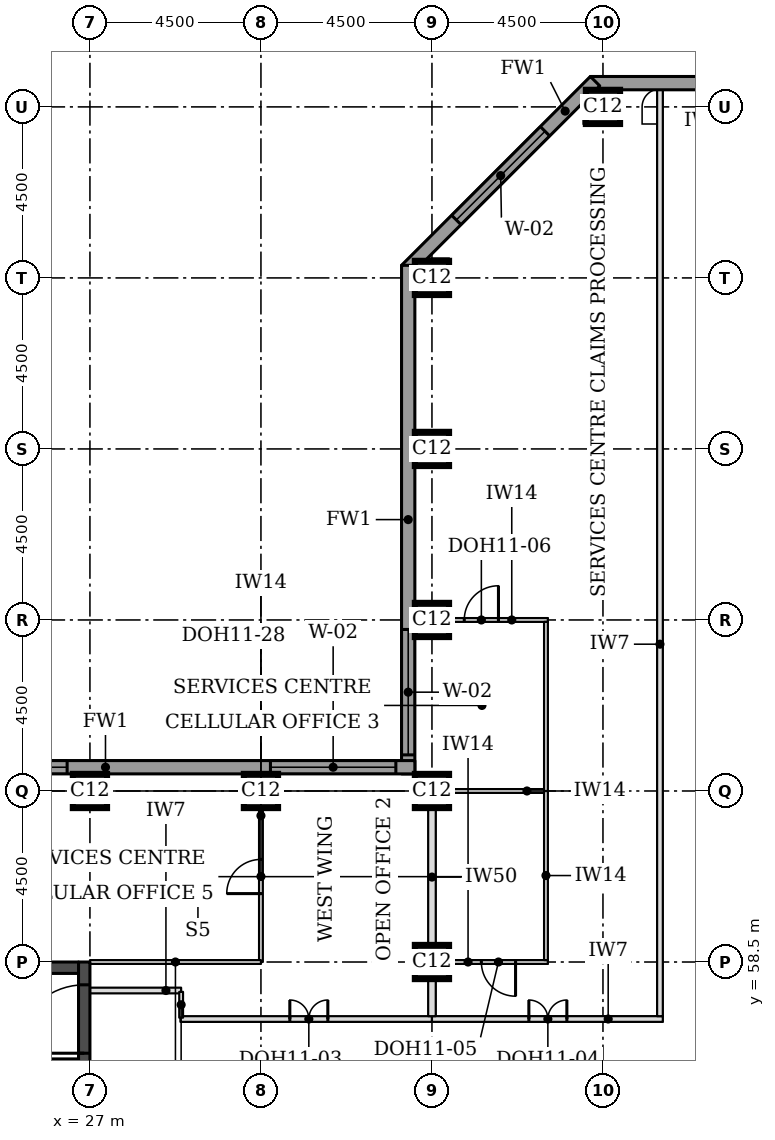
"""IFC4 building model, lengths in metres.
Left out: names, types, materials, properties, quantities, classifications, styles, units other than length and angle.
Written with IfcOpenShell. Run it as: python <this file> out.ifc"""

import sys

from ifc_helpers import new_model, si_unit, direction, frame, frame_2d, origin, origin_2d, place, context, subcontext, project, spatial, rectangle, extrude, element, fill, save


model = new_model("IFC4")
c1 = context("Model", 3, precision=1e-05, world=origin(), true_north=direction((0.0, 1.0)))
c2 = subcontext(c1, "Body", "Model", "MODEL_VIEW")
j1 = project(units=[si_unit("LENGTHUNIT", "METRE"), si_unit("PLANEANGLEUNIT", "RADIAN")], contexts=[c1])
p1 = place(None, origin())
s1 = spatial("IfcSite", under=j1, at=p1, CompositionType="ELEMENT")
p2 = place(p1, origin())
s2 = spatial("IfcBuilding", under=s1, at=p2, CompositionType="ELEMENT")
p3 = place(p2, frame((0.0, 0.0, 234.1)))
s3 = spatial("IfcBuildingStorey", under=s2, at=p3, CompositionType="ELEMENT", Elevation=234.1)
for number, where, z_axis, x_axis in (
    (1, (36.0, 58.5, 0.0), (0.0, 0.0, 1.0), (1.0, 0.0, 0.0)),
    (2, (27.0, 63.0, 0.0), (0.0, 0.0, 1.0), (1.0, 0.0, 0.0)),
    (3, (31.5, 63.0, 0.0), (0.0, 0.0, 1.0), (1.0, 0.0, 0.0)),
    (4, (36.0, 63.0, 0.0), (0.0, 0.0, 1.0), (1.0, 0.0, 0.0)),
    (5, (36.0, 67.5, 0.0), (0.0, 0.0, 1.0), (1.0, 0.0, 0.0)),
    (6, (36.0, 72.0, 0.0), (0.0, 0.0, 1.0), (1.0, 0.0, 0.0)),
    (7, (36.0, 76.5, 0.0), (0.0, 0.0, 1.0), (1.0, 0.0, 0.0)),
    (8, (40.5, 81.0, 0.0), (0.0, 0.0, 1.0), (1.0, 0.0, 0.0)),
):
    element("IfcColumn", number, at=place(p3, frame(where, z_axis=z_axis, x_axis=x_axis)), inside=s3, PredefinedType="COLUMN", context=c2, shape_type="SweptSolid", body=[
        extrude(rectangle(XDim=0.9, YDim=0.9, at=origin_2d()), origin(), (0.0, 0.0, 1.0), 3.7),
    ])
p4 = place(p3, frame((18.3, 58.35, 0.0), z_axis=(0.0, 0.0, 1.0), x_axis=(1.0, 0.0, 0.0)))
e9 = element("IfcWall", 9, at=p4, inside=s3, PredefinedType="SHEAR", context=c2, shape_type="SweptSolid", body=[
    extrude(rectangle(XDim=8.4, YDim=0.3, at=frame_2d((4.2, 0.0))), origin(), (0.0, 0.0, 1.0), 3.7),
])
p5 = place(p3, frame((26.85, 49.5, 0.0), z_axis=(0.0, 0.0, 1.0), x_axis=(0.0, 1.0, 0.0)))
e10 = element("IfcWall", 10, at=p5, inside=s3, PredefinedType="SHEAR", context=c2, shape_type="SweptSolid", body=[
    extrude(rectangle(XDim=9.0, YDim=0.3, at=frame_2d((4.5, 0.0))), origin(), (0.0, 0.0, 1.0), 3.7),
])
p6 = place(p5, frame((6.6, 0.0, 0.0)))
e11 = element("IfcOpeningElement", 11, at=p6, cuts=e10, PredefinedType="OPENING", context=c2, shape_type="SweptSolid", body=[
    extrude(rectangle(XDim=1.8, YDim=2.1, at=frame_2d((0.9, 1.05))), frame((0.0, 0.16, 0.0), z_axis=(0.0, -1.0, 0.0), x_axis=(1.0, 0.0, 0.0)), (0.0, 0.0, 1.0), 0.32),
])
p7 = place(p3, frame((72.331, 81.625, 0.0), z_axis=(0.0, 0.0, 1.0), x_axis=(-1.0, 0.0, 0.0)))
e12 = element("IfcWall", 12, at=p7, inside=s3, PredefinedType="STANDARD", context=c2, shape_type="SweptSolid", body=[
    extrude(rectangle(XDim=32.163, YDim=0.35, at=frame_2d((16.081, 0.0))), origin(), (0.0, 0.0, 1.0), 3.525),
])
p8 = place(p7, frame((5.431, 0.0, 0.9)))
e13 = element("IfcOpeningElement", 13, at=p8, cuts=e12, PredefinedType="OPENING", context=c2, shape_type="SweptSolid", body=[
    extrude(rectangle(XDim=3.3, YDim=1.9, at=frame_2d((1.65, 0.95))), frame((0.0, 0.185, 0.0), z_axis=(0.0, -1.0, 0.0), x_axis=(1.0, 0.0, 0.0)), (0.0, 0.0, 1.0), 0.37),
])
p9 = place(p7, frame((9.931, 0.0, 0.9)))
e14 = element("IfcOpeningElement", 14, at=p9, cuts=e12, PredefinedType="OPENING", context=c2, shape_type="SweptSolid", body=[
    extrude(rectangle(XDim=3.3, YDim=1.9, at=frame_2d((1.65, 0.95))), frame((0.0, 0.185, 0.0), z_axis=(0.0, -1.0, 0.0), x_axis=(1.0, 0.0, 0.0)), (0.0, 0.0, 1.0), 0.37),
])
p10 = place(p7, frame((14.431, 0.0, 0.9)))
e15 = element("IfcOpeningElement", 15, at=p10, cuts=e12, PredefinedType="OPENING", context=c2, shape_type="SweptSolid", body=[
    extrude(rectangle(XDim=3.3, YDim=1.9, at=frame_2d((1.65, 0.95))), frame((0.0, 0.185, 0.0), z_axis=(0.0, -1.0, 0.0), x_axis=(1.0, 0.0, 0.0)), (0.0, 0.0, 1.0), 0.37),
])
p11 = place(p7, frame((18.931, 0.0, 0.9)))
e16 = element("IfcOpeningElement", 16, at=p11, cuts=e12, PredefinedType="OPENING", context=c2, shape_type="SweptSolid", body=[
    extrude(rectangle(XDim=3.3, YDim=1.9, at=frame_2d((1.65, 0.95))), frame((0.0, 0.185, 0.0), z_axis=(0.0, -1.0, 0.0), x_axis=(1.0, 0.0, 0.0)), (0.0, 0.0, 1.0), 0.37),
])
p12 = place(p7, frame((23.431, 0.0, 0.9)))
e17 = element("IfcOpeningElement", 17, at=p12, cuts=e12, PredefinedType="OPENING", context=c2, shape_type="SweptSolid", body=[
    extrude(rectangle(XDim=3.3, YDim=1.9, at=frame_2d((1.65, 0.95))), frame((0.0, 0.185, 0.0), z_axis=(0.0, -1.0, 0.0), x_axis=(1.0, 0.0, 0.0)), (0.0, 0.0, 1.0), 0.37),
])
p13 = place(p3, frame((40.292, 81.676, 0.0), z_axis=(0.0, 0.0, 1.0), x_axis=(-0.707106781187, -0.707106781187, 0.0)))
e18 = element("IfcWall", 18, at=p13, inside=s3, PredefinedType="STANDARD", context=c2, shape_type="SweptSolid", body=[
    extrude(rectangle(XDim=7.027, YDim=0.35, at=frame_2d((3.513, 0.0))), origin(), (0.0, 0.0, 1.0), 3.525),
])
p14 = place(p13, frame((1.863, 0.0, 0.9)))
e19 = element("IfcOpeningElement", 19, at=p14, cuts=e18, PredefinedType="OPENING", context=c2, shape_type="SweptSolid", body=[
    extrude(rectangle(XDim=3.3, YDim=1.9, at=frame_2d((1.65, 0.95))), frame((0.0, 0.185, 0.0), z_axis=(0.0, -1.0, 0.0), x_axis=(1.0, 0.0, 0.0)), (0.0, 0.0, 1.0), 0.37),
])
p15 = place(p3, frame((35.375, 76.831, 0.0), z_axis=(0.0, 0.0, 1.0), x_axis=(0.0, -1.0, 0.0)))
e20 = element("IfcWall", 20, at=p15, inside=s3, PredefinedType="STANDARD", context=c2, shape_type="SweptSolid", body=[
    extrude(rectangle(XDim=13.381, YDim=0.35, at=frame_2d((6.691, 0.0))), origin(), (0.0, 0.0, 1.0), 3.525),
])
p16 = place(p15, frame((9.581, 0.0, 0.9)))
e21 = element("IfcOpeningElement", 21, at=p16, cuts=e20, PredefinedType="OPENING", context=c2, shape_type="SweptSolid", body=[
    extrude(rectangle(XDim=3.3, YDim=1.9, at=frame_2d((1.65, 0.95))), frame((0.0, 0.185, 0.0), z_axis=(0.0, -1.0, 0.0), x_axis=(1.0, 0.0, 0.0)), (0.0, 0.0, 1.0), 0.37),
])
p17 = place(p3, frame((35.55, 63.625, 0.0), z_axis=(0.0, 0.0, 1.0), x_axis=(-1.0, 0.0, 0.0)))
e22 = element("IfcWall", 22, at=p17, inside=s3, PredefinedType="STANDARD", context=c2, shape_type="SweptSolid", body=[
    extrude(rectangle(XDim=17.881, YDim=0.35, at=frame_2d((8.941, 0.0))), origin(), (0.0, 0.0, 1.0), 3.525),
])
p18 = place(p17, frame((0.5, 0.0, 0.9)))
e23 = element("IfcOpeningElement", 23, at=p18, cuts=e22, PredefinedType="OPENING", context=c2, shape_type="SweptSolid", body=[
    extrude(rectangle(XDim=3.3, YDim=1.9, at=frame_2d((1.65, 0.95))), frame((0.0, 0.185, 0.0), z_axis=(0.0, -1.0, 0.0), x_axis=(1.0, 0.0, 0.0)), (0.0, 0.0, 1.0), 0.37),
])
p19 = place(p17, frame((9.15, 0.0, 0.9)))
e24 = element("IfcOpeningElement", 24, at=p19, cuts=e22, PredefinedType="OPENING", context=c2, shape_type="SweptSolid", body=[
    extrude(rectangle(XDim=3.3, YDim=1.9, at=frame_2d((1.65, 0.95))), frame((0.0, 0.185, 0.0), z_axis=(0.0, -1.0, 0.0), x_axis=(1.0, 0.0, 0.0)), (0.0, 0.0, 1.0), 0.37),
])
p20 = place(p3, frame((29.38, 57.0, 0.0), z_axis=(0.0, 0.0, 1.0), x_axis=(1.0, 0.0, 0.0)))
e25 = element("IfcWall", 25, at=p20, inside=s3, PredefinedType="PARTITIONING", context=c2, shape_type="SweptSolid", body=[
    extrude(rectangle(XDim=6.62, YDim=0.15, at=frame_2d((3.31, 0.0))), origin(), (0.0, 0.0, 1.0), 3.55),
])
p21 = place(p20, frame((2.88, 0.0, 0.0)))
e26 = element("IfcOpeningElement", 26, at=p21, cuts=e25, PredefinedType="OPENING", context=c2, shape_type="SweptSolid", body=[
    extrude(rectangle(XDim=1.0, YDim=2.1, at=frame_2d((0.5, 1.05))), frame((0.0, 0.085, 0.0), z_axis=(0.0, -1.0, 0.0), x_axis=(1.0, 0.0, 0.0)), (0.0, 0.0, 1.0), 0.17),
])
p22 = place(p3, frame((36.0, 57.0, 0.0), z_axis=(0.0, 0.0, 1.0), x_axis=(1.0, 0.0, 0.0)))
e27 = element("IfcWall", 27, at=p22, inside=s3, PredefinedType="PARTITIONING", context=c2, shape_type="SweptSolid", body=[
    extrude(rectangle(XDim=6.075, YDim=0.15, at=frame_2d((3.038, 0.0))), origin(), (0.0, 0.0, 1.0), 3.55),
])
p23 = place(p22, frame((2.55, 0.0, 0.0)))
e28 = element("IfcOpeningElement", 28, at=p23, cuts=e27, PredefinedType="OPENING", context=c2, shape_type="SweptSolid", body=[
    extrude(rectangle(XDim=1.0, YDim=2.1, at=frame_2d((0.5, 1.05))), frame((0.0, 0.085, 0.0), z_axis=(0.0, -1.0, 0.0), x_axis=(1.0, 0.0, 0.0)), (0.0, 0.0, 1.0), 0.17),
])
p24 = place(p3, frame((36.45, 58.5, 0.0), z_axis=(0.0, 0.0, 1.0), x_axis=(1.0, 0.0, 0.0)))
e29 = element("IfcWall", 29, at=p24, inside=s3, PredefinedType="PARTITIONING", context=c2, shape_type="SweptSolid", body=[
    extrude(rectangle(XDim=2.6, YDim=0.1, at=frame_2d((1.3, 0.0))), origin(), (0.0, 0.0, 1.0), 3.55),
])
p25 = place(p24, frame((0.85, 0.0, 0.0)))
e30 = element("IfcOpeningElement", 30, at=p25, cuts=e29, PredefinedType="OPENING", context=c2, shape_type="SweptSolid", body=[
    extrude(rectangle(XDim=0.9, YDim=2.1, at=frame_2d((0.45, 1.05))), frame((0.0, 0.06, 0.0), z_axis=(0.0, -1.0, 0.0), x_axis=(1.0, 0.0, 0.0)), (0.0, 0.0, 1.0), 0.12),
])
p26 = place(p3, frame((36.45, 63.0, 0.0), z_axis=(0.0, 0.0, 1.0), x_axis=(1.0, 0.0, 0.0)))
e31 = element("IfcWall", 31, at=p26, inside=s3, PredefinedType="PARTITIONING", context=c2, shape_type="SweptSolid", body=[
    extrude(rectangle(XDim=2.5, YDim=0.1, at=frame_2d((1.25, 0.0))), origin(), (0.0, 0.0, 1.0), 3.55),
])
p27 = place(p3, frame((35.55, 67.5, 0.0), z_axis=(0.0, 0.0, 1.0), x_axis=(1.0, 0.0, 0.0)))
e32 = element("IfcWall", 32, at=p27, inside=s3, PredefinedType="PARTITIONING", context=c2, shape_type="SweptSolid", body=[
    extrude(rectangle(XDim=3.5, YDim=0.1, at=frame_2d((1.75, 0.0))), origin(), (0.0, 0.0, 1.0), 3.55),
])
p28 = place(p27, frame((1.3, 0.0, 0.0)))
e33 = element("IfcOpeningElement", 33, at=p28, cuts=e32, PredefinedType="OPENING", context=c2, shape_type="SweptSolid", body=[
    extrude(rectangle(XDim=0.9, YDim=2.1, at=frame_2d((0.45, 1.05))), frame((0.0, 0.06, 0.0), z_axis=(0.0, -1.0, 0.0), x_axis=(1.0, 0.0, 0.0)), (0.0, 0.0, 1.0), 0.12),
])
p29 = place(p3, frame((36.0, 57.075, 0.0), z_axis=(0.0, 0.0, 1.0), x_axis=(0.0, 1.0, 0.0)))
e34 = element("IfcWall", 34, at=p29, inside=s3, PredefinedType="PARTITIONING", context=c2, shape_type="SweptSolid", body=[
    extrude(rectangle(XDim=0.975, YDim=0.2, at=frame_2d((0.488, 0.0))), origin(), (0.0, 0.0, 1.0), 2.8),
])
p30 = place(p3, frame((42.0, 57.075, 0.0), z_axis=(0.0, 0.0, 1.0), x_axis=(0.0, 1.0, 0.0)))
e35 = element("IfcWall", 35, at=p30, inside=s3, PredefinedType="PARTITIONING", context=c2, shape_type="SweptSolid", body=[
    extrude(rectangle(XDim=24.375, YDim=0.15, at=frame_2d((12.188, 0.0))), origin(), (0.0, 0.0, 1.0), 3.55),
])
p31 = place(p3, frame((39.0, 58.55, 0.0), z_axis=(0.0, 0.0, 1.0), x_axis=(0.0, 1.0, 0.0)))
e36 = element("IfcWall", 36, at=p31, inside=s3, PredefinedType="PARTITIONING", context=c2, shape_type="SweptSolid", body=[
    extrude(rectangle(XDim=4.45, YDim=0.1, at=frame_2d((2.225, 0.0))), origin(), (0.0, 0.0, 1.0), 3.55),
])
p32 = place(p3, frame((36.0, 58.92, 0.0), z_axis=(0.0, 0.0, 1.0), x_axis=(0.0, 1.0, 0.0)))
e37 = element("IfcWall", 37, at=p32, inside=s3, PredefinedType="PARTITIONING", context=c2, shape_type="SweptSolid", body=[
    extrude(rectangle(XDim=3.63, YDim=0.2, at=frame_2d((1.815, 0.0))), origin(), (0.0, 0.0, 1.0), 2.8),
])
p33 = place(p3, frame((39.0, 63.0, 0.0), z_axis=(0.0, 0.0, 1.0), x_axis=(0.0, 1.0, 0.0)))
e38 = element("IfcWall", 38, at=p33, inside=s3, PredefinedType="PARTITIONING", context=c2, shape_type="SweptSolid", body=[
    extrude(rectangle(XDim=4.45, YDim=0.1, at=frame_2d((2.225, 0.0))), origin(), (0.0, 0.0, 1.0), 3.55),
])
p34 = place(p3, frame((31.5, 63.0, 0.0), z_axis=(0.0, 0.0, 1.0), x_axis=(0.0, -1.0, 0.0)))
e39 = element("IfcWall", 39, at=p34, inside=s3, PredefinedType="PARTITIONING", context=c2, shape_type="SweptSolid", body=[
    extrude(rectangle(XDim=4.5, YDim=0.1, at=frame_2d((2.25, 0.0))), origin(), (0.0, 0.0, 1.0), 3.55),
])
p35 = place(p34, frame((1.8, 0.0, 0.0)))
e40 = element("IfcOpeningElement", 40, at=p35, cuts=e39, PredefinedType="OPENING", context=c2, shape_type="SweptSolid", body=[
    extrude(rectangle(XDim=0.9, YDim=2.1, at=frame_2d((0.45, 1.05))), frame((0.0, 0.06, 0.0), z_axis=(0.0, -1.0, 0.0), x_axis=(1.0, 0.0, 0.0)), (0.0, 0.0, 1.0), 0.12),
])
p36 = place(p3, frame((31.5, 58.5, 0.0), z_axis=(0.0, 0.0, 1.0), x_axis=(-1.0, 0.0, 0.0)))
e41 = element("IfcWall", 41, at=p36, inside=s3, PredefinedType="PARTITIONING", context=c2, shape_type="SweptSolid", body=[
    extrude(rectangle(XDim=4.5, YDim=0.1, at=frame_2d((2.25, 0.0))), origin(), (0.0, 0.0, 1.0), 2.55),
])
p37 = place(p3, frame((27.0, 57.75, 0.0), z_axis=(0.0, 0.0, 1.0), x_axis=(1.0, 0.0, 0.0)))
e42 = element("IfcWall", 42, at=p37, inside=s3, PredefinedType="PARTITIONING", context=c2, shape_type="SweptSolid", body=[
    extrude(rectangle(XDim=2.4, YDim=0.15, at=frame_2d((1.2, 0.0))), origin(), (0.0, 0.0, 1.0), 3.55),
])
p38 = place(p3, frame((29.4, 57.715, 0.0), z_axis=(0.0, 0.0, 1.0), x_axis=(0.0, -1.0, 0.0)))
e43 = element("IfcWall", 43, at=p38, inside=s3, PredefinedType="PARTITIONING", context=c2, shape_type="SweptSolid", body=[
    extrude(rectangle(XDim=0.68, YDim=0.1, at=frame_2d((0.34, 0.0))), origin(), (0.0, 0.0, 1.0), 3.55),
])
p39 = place(p3, frame((23.2, 55.85, 0.0), z_axis=(0.0, 0.0, 1.0), x_axis=(1.0, 0.0, 0.0)))
e44 = element("IfcWall", 44, at=p39, inside=s3, PredefinedType="SOLIDWALL", context=c2, shape_type="SweptSolid", body=[
    extrude(rectangle(XDim=3.5, YDim=0.2, at=frame_2d((1.75, 0.0))), origin(), (0.0, 0.0, 1.0), 3.55),
])
p40 = place(p39, frame((1.2, 0.0, 0.0)))
e45 = element("IfcOpeningElement", 45, at=p40, cuts=e44, PredefinedType="OPENING", context=c2, shape_type="SweptSolid", body=[
    extrude(rectangle(XDim=1.1, YDim=2.1, at=frame_2d((0.55, 1.05))), frame((0.0, 0.11, 0.0), z_axis=(0.0, -1.0, 0.0), x_axis=(1.0, 0.0, 0.0)), (0.0, 0.0, 1.0), 0.22),
])
p41 = place(p14, origin())
e46 = element("IfcWindow", 46, at=p41, inside=s3, PartitioningType="SINGLE_PANEL", PredefinedType="WINDOW", context=c2, shape_type="SweptSolid", body=[
    extrude(rectangle(XDim=3.3, YDim=1.9, at=frame_2d((1.65, 0.95))), frame((0.0, 0.085, 0.0), z_axis=(0.0, -1.0, 0.0), x_axis=(1.0, 0.0, 0.0)), (0.0, 0.0, 1.0), 0.06),
])
fill(e19, e46)
p42 = place(p16, origin())
e47 = element("IfcWindow", 47, at=p42, inside=s3, PartitioningType="SINGLE_PANEL", PredefinedType="WINDOW", context=c2, shape_type="SweptSolid", body=[
    extrude(rectangle(XDim=3.3, YDim=1.9, at=frame_2d((1.65, 0.95))), frame((0.0, 0.085, 0.0), z_axis=(0.0, -1.0, 0.0), x_axis=(1.0, 0.0, 0.0)), (0.0, 0.0, 1.0), 0.06),
])
fill(e21, e47)
p43 = place(p18, origin())
e48 = element("IfcWindow", 48, at=p43, inside=s3, PartitioningType="SINGLE_PANEL", PredefinedType="WINDOW", context=c2, shape_type="SweptSolid", body=[
    extrude(rectangle(XDim=3.3, YDim=1.9, at=frame_2d((1.65, 0.95))), frame((0.0, 0.085, 0.0), z_axis=(0.0, -1.0, 0.0), x_axis=(1.0, 0.0, 0.0)), (0.0, 0.0, 1.0), 0.06),
])
fill(e23, e48)
p44 = place(p19, origin())
e49 = element("IfcWindow", 49, at=p44, inside=s3, PartitioningType="SINGLE_PANEL", PredefinedType="WINDOW", context=c2, shape_type="SweptSolid", body=[
    extrude(rectangle(XDim=3.3, YDim=1.9, at=frame_2d((1.65, 0.95))), frame((0.0, 0.085, 0.0), z_axis=(0.0, -1.0, 0.0), x_axis=(1.0, 0.0, 0.0)), (0.0, 0.0, 1.0), 0.06),
])
fill(e24, e49)
p45 = place(p23, origin())
e50 = element("IfcDoor", 50, at=p45, inside=s3, OperationType="DOUBLE_DOOR_SINGLE_SWING", PredefinedType="DOOR", context=c2, shape_type="SweptSolid", body=[
    extrude(rectangle(XDim=1.0, YDim=2.1, at=frame_2d((0.5, 1.05))), frame((0.0, 0.025, 0.0), z_axis=(0.0, -1.0, 0.0), x_axis=(1.0, 0.0, 0.0)), (0.0, 0.0, 1.0), 0.05),
])
fill(e28, e50)
p46 = place(p25, frame((0.9, 0.0, 0.0), z_axis=(0.0, 0.0, 1.0), x_axis=(-1.0, 0.0, 0.0)))
e51 = element("IfcDoor", 51, at=p46, inside=s3, OperationType="SINGLE_SWING_LEFT", PredefinedType="DOOR", context=c2, shape_type="SweptSolid", body=[
    extrude(rectangle(XDim=0.9, YDim=2.1, at=frame_2d((0.45, 1.05))), frame((0.0, 0.025, 0.0), z_axis=(0.0, -1.0, 0.0), x_axis=(1.0, 0.0, 0.0)), (0.0, 0.0, 1.0), 0.05),
])
fill(e30, e51)
p47 = place(p28, origin())
e52 = element("IfcDoor", 52, at=p47, inside=s3, OperationType="SINGLE_SWING_RIGHT", PredefinedType="DOOR", context=c2, shape_type="SweptSolid", body=[
    extrude(rectangle(XDim=0.9, YDim=2.1, at=frame_2d((0.45, 1.05))), frame((0.0, 0.025, 0.0), z_axis=(0.0, -1.0, 0.0), x_axis=(1.0, 0.0, 0.0)), (0.0, 0.0, 1.0), 0.05),
])
fill(e33, e52)
p48 = place(p21, origin())
e53 = element("IfcDoor", 53, at=p48, inside=s3, OperationType="DOUBLE_DOOR_SINGLE_SWING", PredefinedType="DOOR", context=c2, shape_type="SweptSolid", body=[
    extrude(rectangle(XDim=1.0, YDim=2.1, at=frame_2d((0.5, 1.05))), frame((0.0, 0.025, 0.0), z_axis=(0.0, -1.0, 0.0), x_axis=(1.0, 0.0, 0.0)), (0.0, 0.0, 1.0), 0.05),
])
fill(e26, e53)
p49 = place(p35, frame((0.9, 0.0, 0.0), z_axis=(0.0, 0.0, 1.0), x_axis=(-1.0, 0.0, 0.0)))
e54 = element("IfcDoor", 54, at=p49, inside=s3, OperationType="SINGLE_SWING_LEFT", PredefinedType="DOOR", context=c2, shape_type="SweptSolid", body=[
    extrude(rectangle(XDim=0.9, YDim=2.1, at=frame_2d((0.45, 1.05))), frame((0.0, 0.025, 0.0), z_axis=(0.0, -1.0, 0.0), x_axis=(1.0, 0.0, 0.0)), (0.0, 0.0, 1.0), 0.05),
])
fill(e40, e54)
p50 = place(p6, origin())
e55 = element("IfcDoor", 55, at=p50, inside=s3, OperationType="SINGLE_SWING_LEFT", PredefinedType="DOOR", context=c2, shape_type="SweptSolid", body=[
    extrude(rectangle(XDim=1.8, YDim=2.1, at=frame_2d((0.9, 1.05))), frame((0.0, 0.025, 0.0), z_axis=(0.0, -1.0, 0.0), x_axis=(1.0, 0.0, 0.0)), (0.0, 0.0, 1.0), 0.05),
])
fill(e11, e55)
save(model, sys.argv[1])
